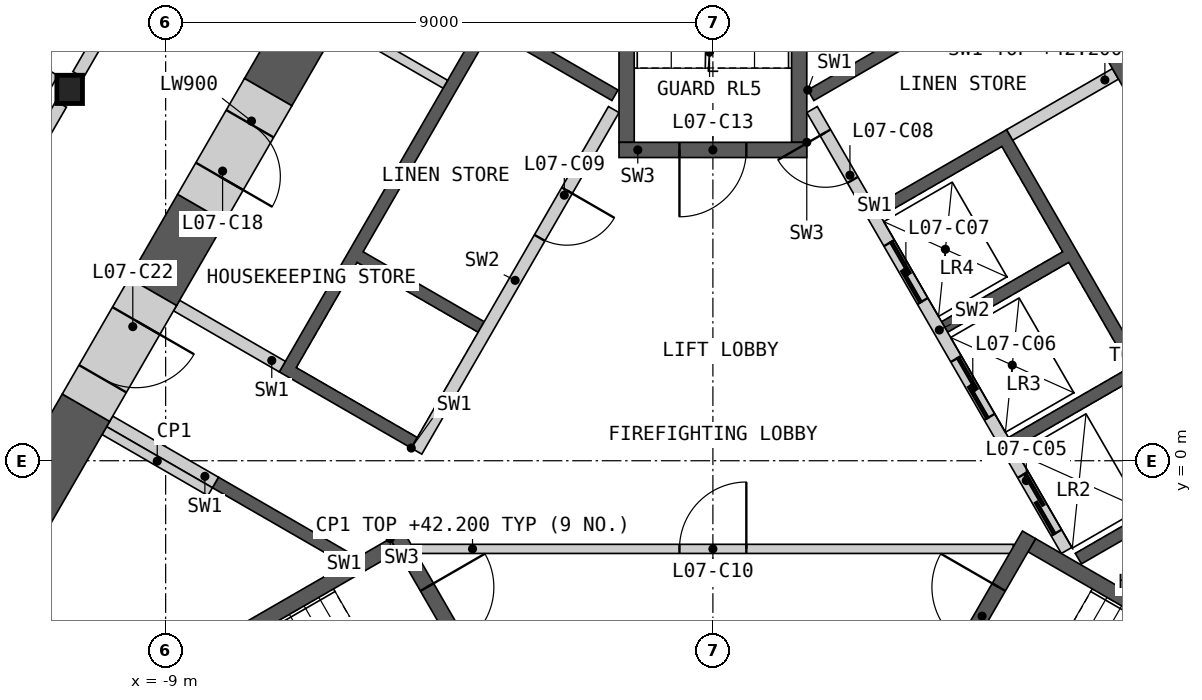
"""IFC4 building model, lengths in metres.
Left out: names, types, materials, properties, quantities, classifications, styles, units other than length and angle.
Written with IfcOpenShell. Run it as: python <this file> out.ifc"""

import sys

from ifc_helpers import new_model, si_unit, direction, frame, frame_2d, origin, origin_2d, place, context, subcontext, project, spatial, polyline, rectangle, i_section, outline, extrude, element, fill, save


model = new_model("IFC4")
c1 = context("Model", 3, precision=1e-05, world=origin(), true_north=direction((0.0, 1.0)))
c2 = subcontext(c1, "Body", "Model", "MODEL_VIEW")
j1 = project(units=[si_unit("LENGTHUNIT", "METRE"), si_unit("PLANEANGLEUNIT", "RADIAN")], contexts=[c1])
p1 = place(None, origin())
s1 = spatial("IfcSite", under=j1, at=p1, CompositionType="ELEMENT")
p2 = place(p1, origin())
s2 = spatial("IfcBuilding", under=s1, at=p2, CompositionType="ELEMENT")
p3 = place(p2, frame((0.0, 0.0, 38.4)))
s3 = spatial("IfcBuildingStorey", under=s2, at=p3, CompositionType="ELEMENT", Elevation=38.4)
p4 = place(p3, frame((-10.578, 6.107, 0.0), z_axis=(0.0, 0.0, 1.0), x_axis=(1.0, 0.0, 0.0)))
e1 = element("IfcColumn", 1, at=p4, inside=s3, PredefinedType="COLUMN", context=c2, shape_type="SweptSolid", body=[
    extrude(i_section(OverallWidth=0.421, OverallDepth=0.465, WebThickness=0.045, FlangeThickness=0.072, at=origin_2d()), origin(), (0.0, 0.0, 1.0), 4.2),
])
p5 = place(p3, origin())
e2 = element("IfcWall", 2, at=p5, inside=s3, PredefinedType="SHEAR", context=c2, shape_type="SweptSolid", body=[
    extrude(outline(polyline([(1.561, 6.097), (3.731, 7.35), (3.831, 7.177), (1.66, 5.924), (1.561, 6.097)])), origin(), (0.0, 0.0, 1.0), 3.8),
])
p6 = place(p3, origin())
e3 = element("IfcWall", 3, at=p6, inside=s3, PredefinedType="SHEAR", context=c2, shape_type="SweptSolid", body=[
    extrude(outline(polyline([(2.66, 4.192), (4.831, 5.445), (8.231, -0.444), (6.061, -1.697), (5.96, -1.524), (7.952, -0.374), (6.952, 1.358), (4.96, 0.208), (4.861, 0.381), (6.852, 1.531), (5.852, 3.263), (3.861, 2.113), (3.76, 2.287), (5.752, 3.437), (4.752, 5.169), (2.76, 4.019), (2.66, 4.192)])), origin(), (0.0, 0.0, 1.0), 3.8),
])
p7 = place(p3, frame((5.817, -1.476, 0.0), z_axis=(0.0, 0.0, 1.0), x_axis=(-0.500002616675, 0.866023893041, 0.0)))
e4 = element("IfcWall", 4, at=p7, inside=s3, PredefinedType="SOLIDWALL", context=c2, shape_type="SweptSolid", body=[
    extrude(rectangle(XDim=8.373, YDim=0.2, at=frame_2d((4.187, 0.0))), origin(), (0.0, 0.0, 1.0), 3.8),
])
p8 = place(p7, frame((0.337, 0.0, 0.0)))
e5 = element("IfcOpeningElement", 5, at=p8, cuts=e4, PredefinedType="OPENING", context=c2, shape_type="SweptSolid", body=[
    extrude(rectangle(XDim=1.1, YDim=2.1, at=frame_2d((0.55, 1.05))), frame((0.0, 0.11, 0.0), z_axis=(0.0, -1.0, 0.0), x_axis=(1.0, 0.0, 0.0)), (0.0, 0.0, 1.0), 0.22),
])
p9 = place(p7, frame((2.537, 0.0, 0.0)))
e6 = element("IfcOpeningElement", 6, at=p9, cuts=e4, PredefinedType="OPENING", context=c2, shape_type="SweptSolid", body=[
    extrude(rectangle(XDim=1.1, YDim=2.1, at=frame_2d((0.55, 1.05))), frame((0.0, 0.11, 0.0), z_axis=(0.0, -1.0, 0.0), x_axis=(1.0, 0.0, 0.0)), (0.0, 0.0, 1.0), 0.22),
])
p10 = place(p7, frame((4.737, 0.0, 0.0)))
e7 = element("IfcOpeningElement", 7, at=p10, cuts=e4, PredefinedType="OPENING", context=c2, shape_type="SweptSolid", body=[
    extrude(rectangle(XDim=1.1, YDim=2.1, at=frame_2d((0.55, 1.05))), frame((0.0, 0.11, 0.0), z_axis=(0.0, -1.0, 0.0), x_axis=(1.0, 0.0, 0.0)), (0.0, 0.0, 1.0), 0.22),
])
p11 = place(p7, frame((7.037, 0.0, 0.0)))
e8 = element("IfcOpeningElement", 8, at=p11, cuts=e4, PredefinedType="OPENING", context=c2, shape_type="SweptSolid", body=[
    extrude(rectangle(XDim=0.9, YDim=2.1, at=frame_2d((0.45, 1.05))), frame((0.0, 0.11, 0.0), z_axis=(0.0, -1.0, 0.0), x_axis=(1.0, 0.0, 0.0)), (0.0, 0.0, 1.0), 0.22),
])
p12 = place(p3, frame((4.881, 5.358, 0.0), z_axis=(0.0, 0.0, 1.0), x_axis=(0.866035824272, 0.499981950752, 0.0)))
e9 = element("IfcWall", 9, at=p12, inside=s3, PredefinedType="SHEAR", context=c2, shape_type="SweptSolid", body=[
    extrude(rectangle(XDim=2.009, YDim=0.2, at=frame_2d((1.004, 0.0))), origin(), (0.0, 0.0, 1.0), 3.8),
])
p13 = place(p3, origin())
e10 = element("IfcWall", 10, at=p13, inside=s3, PredefinedType="SHEAR", context=c2, shape_type="SweptSolid", body=[
    extrude(outline(polyline([(-6.061, -1.697), (-8.231, -0.444), (-8.131, -0.271), (-5.96, -1.524), (-6.061, -1.697)])), origin(), (0.0, 0.0, 1.0), 3.8),
])
p14 = place(p3, origin())
e11 = element("IfcWall", 11, at=p14, inside=s3, PredefinedType="SHEAR", context=c2, shape_type="SweptSolid", body=[
    extrude(outline(polyline([(-4.96, 0.208), (-7.131, 1.461), (-3.731, 7.35), (-1.561, 6.097), (-1.66, 5.924), (-3.652, 7.074), (-5.752, 3.437), (-3.76, 2.287), (-3.861, 2.113), (-5.852, 3.263), (-6.852, 1.531), (-4.861, 0.381), (-4.96, 0.208)])), origin(), (0.0, 0.0, 1.0), 3.8),
])
p15 = place(p3, frame((-1.631, 5.776, 0.0), z_axis=(0.0, 0.0, 1.0), x_axis=(-0.499992876559, -0.866029516466, 0.0)))
e12 = element("IfcWall", 12, at=p15, inside=s3, PredefinedType="SOLIDWALL", context=c2, shape_type="SweptSolid", body=[
    extrude(rectangle(XDim=6.486, YDim=0.2, at=frame_2d((3.243, 0.0))), origin(), (0.0, 0.0, 1.0), 3.8),
])
p16 = place(p15, frame((1.537, 0.0, 0.0)))
e13 = element("IfcOpeningElement", 13, at=p16, cuts=e12, PredefinedType="OPENING", context=c2, shape_type="SweptSolid", body=[
    extrude(rectangle(XDim=0.9, YDim=2.1, at=frame_2d((0.45, 1.05))), frame((0.0, 0.11, 0.0), z_axis=(0.0, -1.0, 0.0), x_axis=(1.0, 0.0, 0.0)), (0.0, 0.0, 1.0), 0.22),
])
p17 = place(p3, frame((-7.081, 1.548, 0.0), z_axis=(0.0, 0.0, 1.0), x_axis=(-0.865983199114, 0.50007309351, 0.0)))
e14 = element("IfcWall", 14, at=p17, inside=s3, PredefinedType="SHEAR", context=c2, shape_type="SweptSolid", body=[
    extrude(rectangle(XDim=2.009, YDim=0.2, at=frame_2d((1.004, 0.0))), origin(), (0.0, 0.0, 1.0), 3.8),
])
p18 = place(p3, frame((-8.181, -0.357, 0.0), z_axis=(0.0, 0.0, 1.0), x_axis=(-0.866035824272, 0.499981950752, 0.0)))
e15 = element("IfcWall", 15, at=p18, inside=s3, PredefinedType="SHEAR", context=c2, shape_type="SweptSolid", body=[
    extrude(rectangle(XDim=2.009, YDim=0.2, at=frame_2d((1.004, 0.0))), origin(), (0.0, 0.0, 1.0), 3.8),
])
p19 = place(p3, frame((-4.941, -1.45, 0.0), z_axis=(0.0, 0.0, 1.0), x_axis=(1.0, 0.0, 0.0)))
e16 = element("IfcWall", 16, at=p19, inside=s3, PredefinedType="PARTITIONING", context=c2, shape_type="SweptSolid", body=[
    extrude(rectangle(XDim=9.882, YDim=0.15, at=frame_2d((4.941, 0.0))), origin(), (0.0, 0.0, 1.0), 3.8),
])
p20 = place(p19, frame((4.391, 0.0, 0.0)))
e17 = element("IfcOpeningElement", 17, at=p20, cuts=e16, PredefinedType="OPENING", context=c2, shape_type="SweptSolid", body=[
    extrude(rectangle(XDim=1.1, YDim=2.1, at=frame_2d((0.55, 1.05))), frame((0.0, 0.085, 0.0), z_axis=(0.0, -1.0, 0.0), x_axis=(1.0, 0.0, 0.0)), (0.0, 0.0, 1.0), 0.17),
])
p21 = place(p3, origin())
e18 = element("IfcWall", 18, at=p21, inside=s3, PredefinedType="SHEAR", context=c2, shape_type="SweptSolid", body=[
    extrude(outline(polyline([(-5.307, -1.281), (-10.374, -4.206), (-10.032, -4.298), (-5.182, -1.498), (-5.307, -1.281)])), origin(), (0.0, 0.0, 1.0), 3.8),
])
p22 = place(p3, frame((-5.199, -1.219, 0.0), z_axis=(0.0, 0.0, 1.0), x_axis=(0.499982516597, -0.866035497597, 0.0)))
e19 = element("IfcWall", 19, at=p22, inside=s3, PredefinedType="SHEAR", context=c2, shape_type="SweptSolid", body=[
    extrude(rectangle(XDim=3.088, YDim=0.25, at=frame_2d((1.544, 0.0))), origin(), (0.0, 0.0, 1.0), 3.8),
])
p23 = place(p22, frame((0.994, 0.0, 0.0)))
e20 = element("IfcOpeningElement", 20, at=p23, cuts=e19, PredefinedType="OPENING", context=c2, shape_type="SweptSolid", body=[
    extrude(rectangle(XDim=1.1, YDim=2.1, at=frame_2d((0.55, 1.05))), frame((0.0, 0.135, 0.0), z_axis=(0.0, -1.0, 0.0), x_axis=(1.0, 0.0, 0.0)), (0.0, 0.0, 1.0), 0.27),
])
p24 = place(p3, origin())
e21 = element("IfcWall", 21, at=p24, inside=s3, PredefinedType="SHEAR", context=c2, shape_type="SweptSolid", body=[
    extrude(outline(polyline([(10.032, -4.298), (10.374, -4.206), (5.307, -1.281), (5.182, -1.498), (10.032, -4.298)])), origin(), (0.0, 0.0, 1.0), 3.8),
])
p25 = place(p3, frame((3.655, -3.893, 0.0), z_axis=(0.0, 0.0, 1.0), x_axis=(0.499982516597, 0.866035497597, 0.0)))
e22 = element("IfcWall", 22, at=p25, inside=s3, PredefinedType="SHEAR", context=c2, shape_type="SweptSolid", body=[
    extrude(rectangle(XDim=3.088, YDim=0.25, at=frame_2d((1.544, 0.0))), origin(), (0.0, 0.0, 1.0), 3.8),
])
p26 = place(p25, frame((0.994, 0.0, 0.0)))
e23 = element("IfcOpeningElement", 23, at=p26, cuts=e22, PredefinedType="OPENING", context=c2, shape_type="SweptSolid", body=[
    extrude(rectangle(XDim=1.1, YDim=2.1, at=frame_2d((0.55, 1.05))), frame((0.0, 0.135, 0.0), z_axis=(0.0, -1.0, 0.0), x_axis=(1.0, 0.0, 0.0)), (0.0, 0.0, 1.0), 0.27),
])
p27 = place(p3, origin())
e24 = element("IfcWall", 24, at=p27, inside=s3, PredefinedType="SHEAR", context=c2, shape_type="SweptSolid", body=[
    extrude(outline(polyline([(1.544, 5.237), (1.544, 11.087), (1.294, 10.837), (1.294, 5.237), (1.544, 5.237)])), origin(), (0.0, 0.0, 1.0), 3.8),
])
p28 = place(p3, origin())
e25 = element("IfcWall", 25, at=p28, inside=s3, PredefinedType="SHEAR", context=c2, shape_type="SweptSolid", body=[
    extrude(outline(polyline([(-1.294, 10.837), (-1.544, 11.087), (-1.544, 5.237), (-1.294, 5.237), (-1.294, 10.837)])), origin(), (0.0, 0.0, 1.0), 3.8),
])
p29 = place(p3, frame((1.544, 5.112, 0.0), z_axis=(0.0, 0.0, 1.0), x_axis=(-1.0, 0.0, 0.0)))
e26 = element("IfcWall", 26, at=p29, inside=s3, PredefinedType="SHEAR", context=c2, shape_type="SweptSolid", body=[
    extrude(rectangle(XDim=3.088, YDim=0.25, at=frame_2d((1.544, 0.0))), origin(), (0.0, 0.0, 1.0), 3.8),
])
p30 = place(p29, frame((0.994, 0.0, 0.0)))
e27 = element("IfcOpeningElement", 27, at=p30, cuts=e26, PredefinedType="OPENING", context=c2, shape_type="SweptSolid", body=[
    extrude(rectangle(XDim=1.1, YDim=2.1, at=frame_2d((0.55, 1.05))), frame((0.0, 0.135, 0.0), z_axis=(0.0, -1.0, 0.0), x_axis=(1.0, 0.0, 0.0)), (0.0, 0.0, 1.0), 0.27),
])
for number, where, z_axis, x_axis in (
    (28, (-8.268, -0.509, 0.0), (0.0, 0.0, 1.0), (-0.866, 0.5, 0.0)),
    (29, (-6.139, 7.196, 0.0), (0.0, 0.0, 1.0), (0.866, -0.5, 0.0)),
):
    element("IfcWall", number, at=place(p3, frame(where, z_axis=z_axis, x_axis=x_axis)), inside=s3, PredefinedType="PARTITIONING", context=c2, shape_type="SweptSolid", body=[
        extrude(rectangle(XDim=2.009, YDim=0.15, at=frame_2d((1.004, 0.0))), origin(), (0.0, 0.0, 1.0), 3.8),
    ])
p31 = place(p3, frame((8.16, 4.596, 0.0), z_axis=(0.0, 0.0, 1.0), x_axis=(-0.500012259336, 0.866018325738, 0.0)))
e30 = element("IfcWall", 30, at=p31, inside=s3, PredefinedType="SHEAR", context=c2, shape_type="SweptSolid", body=[
    extrude(rectangle(XDim=7.389, YDim=0.9, at=frame_2d((3.695, 0.0))), origin(), (0.0, 0.0, 1.0), 3.8),
])
p32 = place(p3, frame((-10.31, 0.872, 0.0), z_axis=(0.0, 0.0, 1.0), x_axis=(-0.499946751862, -0.866056144429, 0.0)))
e31 = element("IfcWall", 31, at=p32, inside=s3, PredefinedType="SHEAR", context=c2, shape_type="SweptSolid", body=[
    extrude(rectangle(XDim=2.889, YDim=0.9, at=frame_2d((1.445, 0.0))), origin(), (0.0, 0.0, 1.0), 3.8),
])
p33 = place(p3, frame((-6.145, 8.086, 0.0), z_axis=(0.0, 0.0, 1.0), x_axis=(-0.500026924946, -0.866009858102, 0.0)))
e32 = element("IfcWall", 32, at=p33, inside=s3, PredefinedType="SHEAR", context=c2, shape_type="SweptSolid", body=[
    extrude(rectangle(XDim=2.337, YDim=0.9, at=frame_2d((1.168, 0.0))), origin(), (0.0, 0.0, 1.0), 3.8),
])
p34 = place(p3, frame((-8.413, 4.157, 0.0), z_axis=(0.0, 0.0, 1.0), x_axis=(-0.499961121316, -0.86604784924, 0.0)))
e33 = element("IfcWall", 33, at=p34, inside=s3, PredefinedType="SHEAR", context=c2, shape_type="SweptSolid", body=[
    extrude(rectangle(XDim=1.594, YDim=0.9, at=frame_2d((0.797, 0.0))), origin(), (0.0, 0.0, 1.0), 3.8),
])
p35 = place(p3, frame((-7.313, 6.062, 0.0), z_axis=(0.0, 0.0, 1.0), x_axis=(-0.500077893725, -0.86598042715, 0.0)))
e34 = element("IfcWall", 34, at=p35, inside=s3, PredefinedType="SHEAR", context=c2, shape_type="SweptSolid", body=[
    extrude(rectangle(XDim=2.2, YDim=0.9, at=frame_2d((1.1, 0.0))), origin(), (0.0, 0.0, 1.0), 3.8),
])
p36 = place(p35, frame((0.6, 0.0, 0.0)))
e35 = element("IfcOpeningElement", 35, at=p36, cuts=e34, PredefinedType="OPENING", context=c2, shape_type="SweptSolid", body=[
    extrude(rectangle(XDim=1.0, YDim=2.1, at=frame_2d((0.5, 1.05))), frame((0.0, 0.46, 0.0), z_axis=(0.0, -1.0, 0.0), x_axis=(1.0, 0.0, 0.0)), (0.0, 0.0, 1.0), 0.92),
])
p37 = place(p3, frame((-9.21, 2.777, 0.0), z_axis=(0.0, 0.0, 1.0), x_axis=(-0.500077893725, -0.86598042715, 0.0)))
e36 = element("IfcWall", 36, at=p37, inside=s3, PredefinedType="SHEAR", context=c2, shape_type="SweptSolid", body=[
    extrude(rectangle(XDim=2.2, YDim=0.9, at=frame_2d((1.1, 0.0))), origin(), (0.0, 0.0, 1.0), 3.8),
])
p38 = place(p37, frame((0.55, 0.0, 0.0)))
e37 = element("IfcOpeningElement", 37, at=p38, cuts=e36, PredefinedType="OPENING", context=c2, shape_type="SweptSolid", body=[
    extrude(rectangle(XDim=1.1, YDim=2.1, at=frame_2d((0.55, 1.05))), frame((0.0, 0.46, 0.0), z_axis=(0.0, -1.0, 0.0), x_axis=(1.0, 0.0, 0.0)), (0.0, 0.0, 1.0), 0.92),
])
p39 = place(p3, frame((5.429, 15.026, 0.0), z_axis=(0.0, 0.0, 1.0), x_axis=(0.50001002959, -0.86601961312, 0.0)))
e38 = element("IfcWall", 38, at=p39, inside=s3, PredefinedType="PARTITIONING", context=c2, shape_type="SweptSolid", body=[
    extrude(rectangle(XDim=10.019, YDim=0.2, at=frame_2d((5.009, 0.0))), origin(), (0.0, 0.0, 1.0), 3.8),
])
p40 = place(p39, frame((7.266, 0.0, 0.0)))
e39 = element("IfcOpeningElement", 39, at=p40, cuts=e38, PredefinedType="OPENING", context=c2, shape_type="SweptSolid", body=[
    extrude(rectangle(XDim=1.0, YDim=2.1, at=frame_2d((0.5, 1.05))), frame((0.0, 0.11, 0.0), z_axis=(0.0, -1.0, 0.0), x_axis=(1.0, 0.0, 0.0)), (0.0, 0.0, 1.0), 0.22),
])
p41 = place(p39, frame((2.254, 0.0, 0.0)))
e40 = element("IfcOpeningElement", 40, at=p41, cuts=e38, PredefinedType="OPENING", context=c2, shape_type="SweptSolid", body=[
    extrude(rectangle(XDim=1.0, YDim=2.1, at=frame_2d((0.5, 1.05))), frame((0.0, 0.11, 0.0), z_axis=(0.0, -1.0, 0.0), x_axis=(1.0, 0.0, 0.0)), (0.0, 0.0, 1.0), 0.22),
])
p42 = place(p3, frame((-10.439, 6.35, 0.0), z_axis=(0.0, 0.0, 1.0), x_axis=(0.50001002959, 0.86601961312, 0.0)))
e41 = element("IfcWall", 41, at=p42, inside=s3, PredefinedType="PARTITIONING", context=c2, shape_type="SweptSolid", body=[
    extrude(rectangle(XDim=10.019, YDim=0.2, at=frame_2d((5.009, 0.0))), origin(), (0.0, 0.0, 1.0), 3.8),
])
p43 = place(p42, frame((4.16, 0.0, 0.0)))
e42 = element("IfcOpeningElement", 42, at=p43, cuts=e41, PredefinedType="OPENING", context=c2, shape_type="SweptSolid", body=[
    extrude(rectangle(XDim=1.8, YDim=2.1, at=frame_2d((0.9, 1.05))), frame((0.0, 0.11, 0.0), z_axis=(0.0, -1.0, 0.0), x_axis=(1.0, 0.0, 0.0)), (0.0, 0.0, 1.0), 0.22),
])
p44 = place(p3, frame((-15.728, -2.811, 0.0), z_axis=(0.0, 0.0, 1.0), x_axis=(0.49999175339, 0.866030164915, 0.0)))
e43 = element("IfcWall", 43, at=p44, inside=s3, PredefinedType="PARTITIONING", context=c2, shape_type="SweptSolid", body=[
    extrude(rectangle(XDim=10.019, YDim=0.2, at=frame_2d((5.009, 0.0))), origin(), (0.0, 0.0, 1.0), 3.8),
])
p45 = place(p44, frame((4.484, 0.0, 0.0)))
e44 = element("IfcOpeningElement", 44, at=p45, cuts=e43, PredefinedType="OPENING", context=c2, shape_type="SweptSolid", body=[
    extrude(rectangle(XDim=0.95, YDim=2.1, at=frame_2d((0.475, 1.05))), frame((0.0, 0.11, 0.0), z_axis=(0.0, -1.0, 0.0), x_axis=(1.0, 0.0, 0.0)), (0.0, 0.0, 1.0), 0.22),
])
p46 = place(p3, frame((-21.947, 12.671, 0.0), z_axis=(0.0, 0.0, 1.0), x_axis=(0.866026729935, -0.499997703033, 0.0)))
e45 = element("IfcWall", 45, at=p46, inside=s3, PredefinedType="PARTITIONING", context=c2, shape_type="SweptSolid", body=[
    extrude(rectangle(XDim=12.848, YDim=0.2, at=frame_2d((6.424, 0.0))), origin(), (0.0, 0.0, 1.0), 2.885),
])
p47 = place(p8, origin())
e46 = element("IfcDoor", 46, at=p47, inside=s3, OperationType="SLIDING_TO_LEFT", PredefinedType="DOOR", context=c2, shape_type="SweptSolid", body=[
    extrude(rectangle(XDim=1.1, YDim=2.1, at=frame_2d((0.55, 1.05))), frame((0.0, 0.025, 0.0), z_axis=(0.0, -1.0, 0.0), x_axis=(1.0, 0.0, 0.0)), (0.0, 0.0, 1.0), 0.05),
])
fill(e5, e46)
p48 = place(p9, origin())
e47 = element("IfcDoor", 47, at=p48, inside=s3, OperationType="SLIDING_TO_LEFT", PredefinedType="DOOR", context=c2, shape_type="SweptSolid", body=[
    extrude(rectangle(XDim=1.1, YDim=2.1, at=frame_2d((0.55, 1.05))), frame((0.0, 0.025, 0.0), z_axis=(0.0, -1.0, 0.0), x_axis=(1.0, 0.0, 0.0)), (0.0, 0.0, 1.0), 0.05),
])
fill(e6, e47)
p49 = place(p10, origin())
e48 = element("IfcDoor", 48, at=p49, inside=s3, OperationType="SLIDING_TO_LEFT", PredefinedType="DOOR", context=c2, shape_type="SweptSolid", body=[
    extrude(rectangle(XDim=1.1, YDim=2.1, at=frame_2d((0.55, 1.05))), frame((0.0, 0.025, 0.0), z_axis=(0.0, -1.0, 0.0), x_axis=(1.0, 0.0, 0.0)), (0.0, 0.0, 1.0), 0.05),
])
fill(e7, e48)
p50 = place(p11, origin())
e49 = element("IfcDoor", 49, at=p50, inside=s3, OperationType="SINGLE_SWING_RIGHT", PredefinedType="DOOR", context=c2, shape_type="SweptSolid", body=[
    extrude(rectangle(XDim=0.9, YDim=2.1, at=frame_2d((0.45, 1.05))), frame((0.0, 0.025, 0.0), z_axis=(0.0, -1.0, 0.0), x_axis=(1.0, 0.0, 0.0)), (0.0, 0.0, 1.0), 0.05),
])
fill(e8, e49)
p51 = place(p16, origin())
e50 = element("IfcDoor", 50, at=p51, inside=s3, OperationType="SINGLE_SWING_LEFT", PredefinedType="DOOR", context=c2, shape_type="SweptSolid", body=[
    extrude(rectangle(XDim=0.9, YDim=2.1, at=frame_2d((0.45, 1.05))), frame((0.0, 0.025, 0.0), z_axis=(0.0, -1.0, 0.0), x_axis=(1.0, 0.0, 0.0)), (0.0, 0.0, 1.0), 0.05),
])
fill(e13, e50)
p52 = place(p20, origin())
e51 = element("IfcDoor", 51, at=p52, inside=s3, OperationType="SINGLE_SWING_RIGHT", PredefinedType="DOOR", context=c2, shape_type="SweptSolid", body=[
    extrude(rectangle(XDim=1.1, YDim=2.1, at=frame_2d((0.55, 1.05))), frame((0.0, 0.025, 0.0), z_axis=(0.0, -1.0, 0.0), x_axis=(1.0, 0.0, 0.0)), (0.0, 0.0, 1.0), 0.05),
])
fill(e17, e51)
p53 = place(p23, origin())
e52 = element("IfcDoor", 52, at=p53, inside=s3, OperationType="SINGLE_SWING_LEFT", PredefinedType="DOOR", context=c2, shape_type="SweptSolid", body=[
    extrude(rectangle(XDim=1.1, YDim=2.1, at=frame_2d((0.55, 1.05))), frame((0.0, 0.025, 0.0), z_axis=(0.0, -1.0, 0.0), x_axis=(1.0, 0.0, 0.0)), (0.0, 0.0, 1.0), 0.05),
])
fill(e20, e52)
p54 = place(p26, origin())
e53 = element("IfcDoor", 53, at=p54, inside=s3, OperationType="SINGLE_SWING_RIGHT", PredefinedType="DOOR", context=c2, shape_type="SweptSolid", body=[
    extrude(rectangle(XDim=1.1, YDim=2.1, at=frame_2d((0.55, 1.05))), frame((0.0, 0.025, 0.0), z_axis=(0.0, -1.0, 0.0), x_axis=(1.0, 0.0, 0.0)), (0.0, 0.0, 1.0), 0.05),
])
fill(e23, e53)
p55 = place(p30, origin())
e54 = element("IfcDoor", 54, at=p55, inside=s3, OperationType="SINGLE_SWING_RIGHT", PredefinedType="DOOR", context=c2, shape_type="SweptSolid", body=[
    extrude(rectangle(XDim=1.1, YDim=2.1, at=frame_2d((0.55, 1.05))), frame((0.0, 0.025, 0.0), z_axis=(0.0, -1.0, 0.0), x_axis=(1.0, 0.0, 0.0)), (0.0, 0.0, 1.0), 0.05),
])
fill(e27, e54)
p56 = place(p36, origin())
e55 = element("IfcDoor", 55, at=p56, inside=s3, OperationType="SINGLE_SWING_RIGHT", PredefinedType="DOOR", context=c2, shape_type="SweptSolid", body=[
    extrude(rectangle(XDim=1.0, YDim=2.1, at=frame_2d((0.5, 1.05))), frame((0.0, 0.205, 0.0), z_axis=(0.0, -1.0, 0.0), x_axis=(1.0, 0.0, 0.0)), (0.0, 0.0, 1.0), 0.05),
])
fill(e35, e55)
p57 = place(p38, origin())
e56 = element("IfcDoor", 56, at=p57, inside=s3, OperationType="SINGLE_SWING_LEFT", PredefinedType="DOOR", context=c2, shape_type="SweptSolid", body=[
    extrude(rectangle(XDim=1.1, YDim=2.1, at=frame_2d((0.55, 1.05))), frame((0.0, 0.205, 0.0), z_axis=(0.0, -1.0, 0.0), x_axis=(1.0, 0.0, 0.0)), (0.0, 0.0, 1.0), 0.05),
])
fill(e37, e56)
save(model, sys.argv[1])
